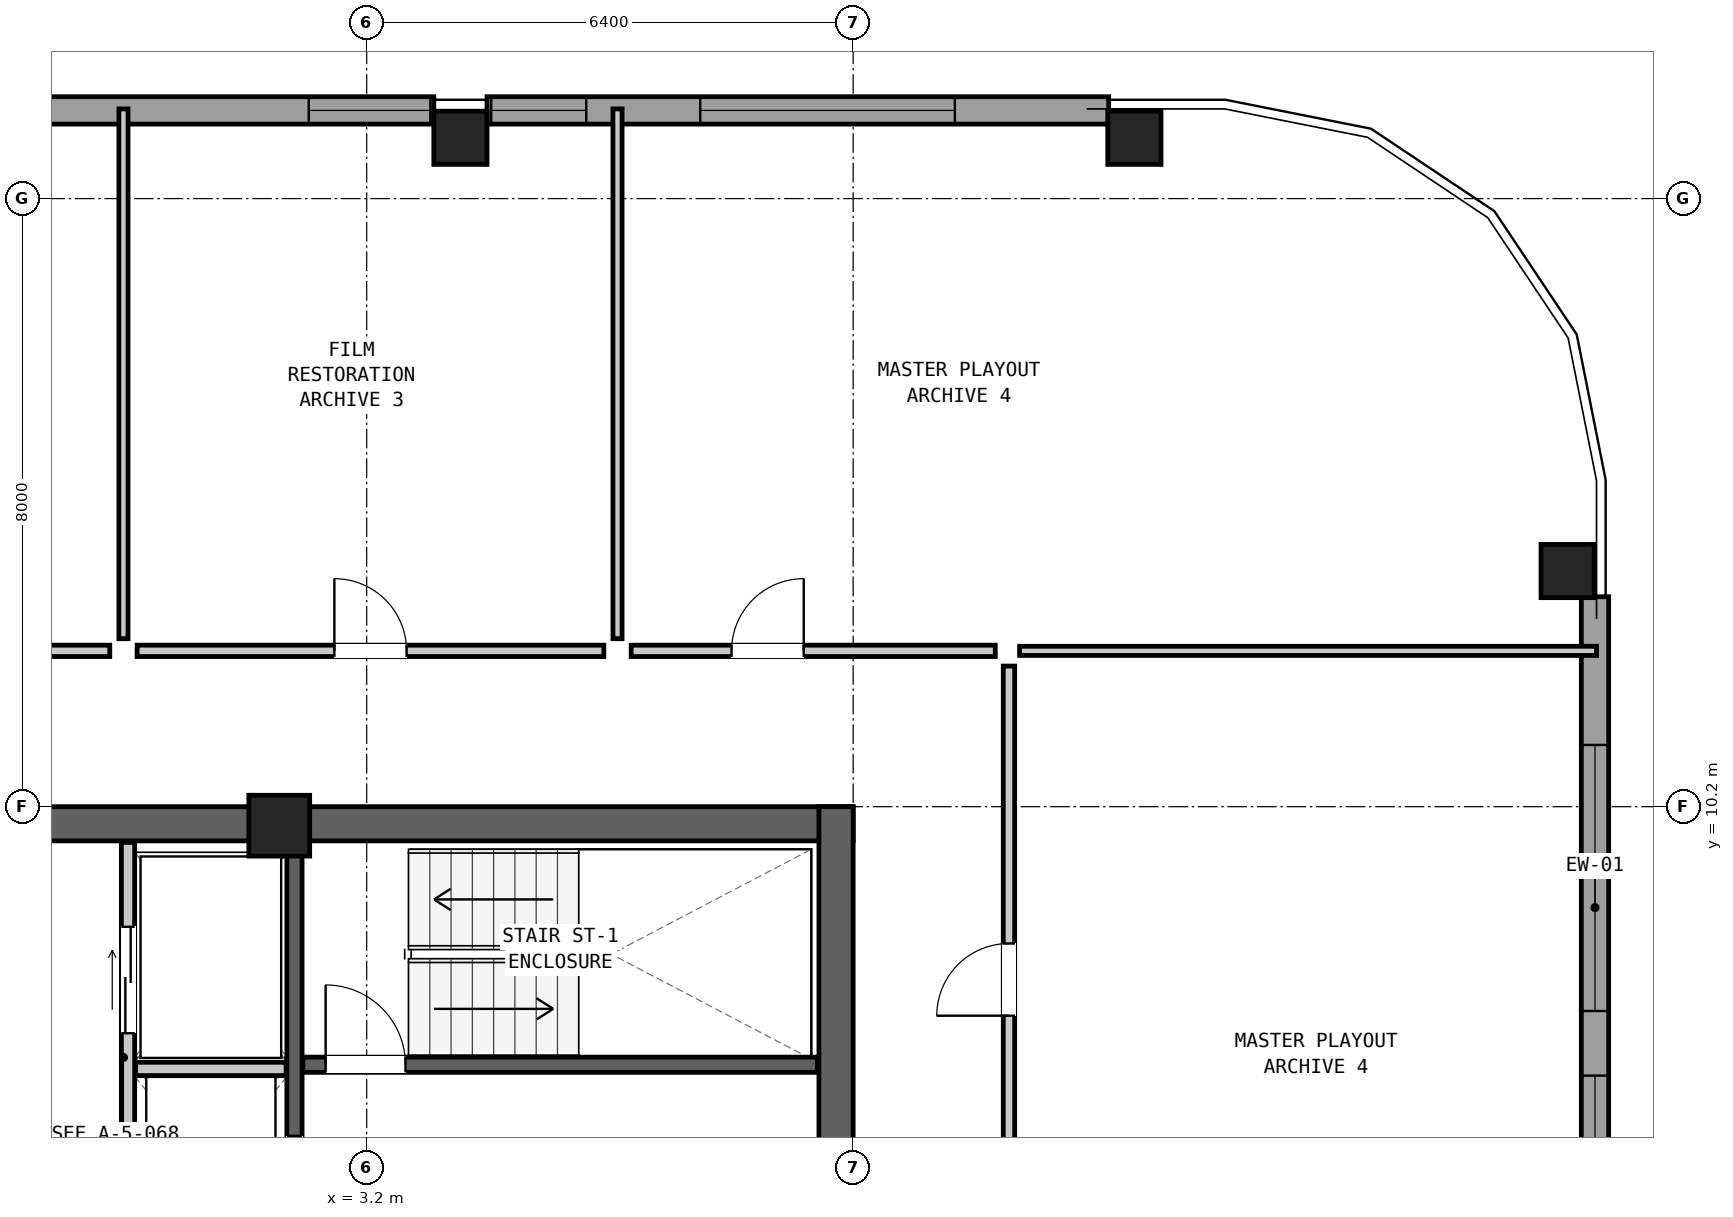
"""IFC4 building model, lengths in metres.
Left out: names, types, materials, properties, quantities, classifications, styles, units other than length and angle.
Written with IfcOpenShell. Run it as: python <this file> out.ifc"""

import sys

from ifc_helpers import new_model, si_unit, direction, frame, frame_2d, origin, origin_2d, place, context, subcontext, project, spatial, rectangle, hollow_rectangle, extrude, element, fill, save


model = new_model("IFC4")
c1 = context("Model", 3, precision=1e-05, world=origin(), true_north=direction((0.0, 1.0)))
c2 = subcontext(c1, "Body", "Model", "MODEL_VIEW")
j1 = project(units=[si_unit("LENGTHUNIT", "METRE"), si_unit("PLANEANGLEUNIT", "RADIAN")], contexts=[c1])
p1 = place(None, origin())
s1 = spatial("IfcSite", under=j1, at=p1, CompositionType="ELEMENT")
p2 = place(p1, origin())
s2 = spatial("IfcBuilding", under=s1, at=p2, CompositionType="ELEMENT")
p3 = place(p2, frame((0.0, 0.0, 220.85)))
s3 = spatial("IfcBuildingStorey", under=s2, at=p3, CompositionType="ELEMENT", Elevation=220.85)
p4 = place(p3, frame((-9.6, 9.975, 0.0), z_axis=(0.0, 0.0, 1.0), x_axis=(1.0, 0.0, 0.0)))
e1 = element("IfcWall", 1, at=p4, inside=s3, PredefinedType="SHEAR", context=c2, shape_type="SweptSolid", body=[
    extrude(rectangle(XDim=19.2, YDim=0.45, at=frame_2d((9.6, 0.0))), origin(), (0.0, 0.0, 1.0), 3.05),
])
p5 = place(p3, frame((9.375, 3.6, 0.0), z_axis=(0.0, 0.0, 1.0), x_axis=(0.0, 1.0, 0.0)))
e2 = element("IfcWall", 2, at=p5, inside=s3, PredefinedType="SHEAR", context=c2, shape_type="SweptSolid", body=[
    extrude(rectangle(XDim=6.6, YDim=0.45, at=frame_2d((3.3, 0.0))), origin(), (0.0, 0.0, 1.0), 3.05),
])
for number, where, z_axis, x_axis in (
    (3, (19.0, 13.3, 0.0), (0.0, 0.0, 1.0), (0.0, 1.0, 0.0)),
    (4, (13.3, 19.0, 0.0), (0.0, 0.0, 1.0), (1.0, 0.0, 0.0)),
    (5, (4.433, 19.0, 0.0), (0.0, 0.0, 1.0), (1.0, 0.0, 0.0)),
):
    element("IfcColumn", number, at=place(p3, frame(where, z_axis=z_axis, x_axis=x_axis)), inside=s3, PredefinedType="COLUMN", context=c2, shape_type="SweptSolid", body=[
        extrude(hollow_rectangle(XDim=0.7, YDim=0.7, WallThickness=0.045, at=origin_2d()), origin(), (0.0, 0.0, 1.0), 3.05),
    ])
p6 = place(p3, frame((2.05, 9.95, 0.0), z_axis=(0.0, 0.0, 1.0), x_axis=(1.0, 0.0, 0.0)))
e6 = element("IfcColumn", 6, at=p6, inside=s3, PredefinedType="COLUMN", context=c2, shape_type="SweptSolid", body=[
    extrude(rectangle(XDim=0.8, YDim=0.8, at=origin_2d()), origin(), (0.0, 0.0, 1.0), 3.05),
])
p7 = place(p3, frame((19.36, 12.962, 0.0), z_axis=(0.0, 0.0, 1.0), x_axis=(0.0, -1.0, 0.0)))
e7 = element("IfcWall", 7, at=p7, inside=s3, PredefinedType="SOLIDWALL", context=c2, shape_type="SweptSolid", body=[
    extrude(rectangle(XDim=8.179, YDim=0.36, at=frame_2d((4.089, 0.0))), origin(), (0.0, 0.0, 1.0), 2.374),
])
p8 = place(p7, frame((1.95, 0.0, 0.2)))
e8 = element("IfcOpeningElement", 8, at=p8, cuts=e7, PredefinedType="OPENING", context=c2, shape_type="SweptSolid", body=[
    extrude(rectangle(XDim=3.5, YDim=0.95, at=frame_2d((1.75, 0.475))), frame((0.0, 0.192, 0.0), z_axis=(0.0, -1.0, 0.0), x_axis=(1.0, 0.0, 0.0)), (0.0, 0.0, 1.0), 0.384),
])
p9 = place(p7, frame((6.3, 0.0, 1.15)))
e9 = element("IfcOpeningElement", 9, at=p9, cuts=e7, PredefinedType="OPENING", context=c2, shape_type="SweptSolid", body=[
    extrude(rectangle(XDim=1.8, YDim=1.05, at=frame_2d((0.9, 0.525))), frame((0.0, 0.192, 0.0), z_axis=(0.0, -1.0, 0.0), x_axis=(1.0, 0.0, 0.0)), (0.0, 0.0, 1.0), 0.384),
])
p10 = place(p3, frame((-4.083, 19.36, 0.0), z_axis=(0.0, 0.0, 1.0), x_axis=(1.0, 0.0, 0.0)))
e10 = element("IfcWall", 10, at=p10, inside=s3, PredefinedType="SOLIDWALL", context=c2, shape_type="SweptSolid", body=[
    extrude(rectangle(XDim=8.167, YDim=0.36, at=frame_2d((4.083, 0.0))), origin(), (0.0, 0.0, 1.0), 2.374),
])
p11 = place(p10, frame((0.071, 0.0, 1.25)))
e11 = element("IfcOpeningElement", 11, at=p11, cuts=e10, PredefinedType="OPENING", context=c2, shape_type="SweptSolid", body=[
    extrude(rectangle(XDim=1.4, YDim=0.95, at=frame_2d((0.7, 0.475))), frame((0.0, 0.192, 0.0), z_axis=(0.0, -1.0, 0.0), x_axis=(1.0, 0.0, 0.0)), (0.0, 0.0, 1.0), 0.384),
])
p12 = place(p10, frame((6.521, 0.0, 1.35)))
e12 = element("IfcOpeningElement", 12, at=p12, cuts=e10, PredefinedType="OPENING", context=c2, shape_type="SweptSolid", body=[
    extrude(rectangle(XDim=1.6, YDim=0.85, at=frame_2d((0.8, 0.425))), frame((0.0, 0.192, 0.0), z_axis=(0.0, -1.0, 0.0), x_axis=(1.0, 0.0, 0.0)), (0.0, 0.0, 1.0), 0.384),
])
p13 = place(p3, frame((4.783, 19.36, 0.0), z_axis=(0.0, 0.0, 1.0), x_axis=(1.0, 0.0, 0.0)))
e13 = element("IfcWall", 13, at=p13, inside=s3, PredefinedType="SOLIDWALL", context=c2, shape_type="SweptSolid", body=[
    extrude(rectangle(XDim=8.179, YDim=0.36, at=frame_2d((4.089, 0.0))), origin(), (0.0, 0.0, 1.0), 2.374),
])
p14 = place(p13, frame((0.055, 0.0, 0.9)))
e14 = element("IfcOpeningElement", 14, at=p14, cuts=e13, PredefinedType="OPENING", context=c2, shape_type="SweptSolid", body=[
    extrude(rectangle(XDim=1.25, YDim=1.3, at=frame_2d((0.625, 0.65))), frame((0.0, 0.192, 0.0), z_axis=(0.0, -1.0, 0.0), x_axis=(1.0, 0.0, 0.0)), (0.0, 0.0, 1.0), 0.384),
])
p15 = place(p13, frame((2.805, 0.0, 0.2)))
e15 = element("IfcOpeningElement", 15, at=p15, cuts=e13, PredefinedType="OPENING", context=c2, shape_type="SweptSolid", body=[
    extrude(rectangle(XDim=3.35, YDim=0.9, at=frame_2d((1.675, 0.45))), frame((0.0, 0.192, 0.0), z_axis=(0.0, -1.0, 0.0), x_axis=(1.0, 0.0, 0.0)), (0.0, 0.0, 1.0), 0.384),
])
p16 = place(p3, frame((2.36, 6.805, 0.0), z_axis=(0.0, 0.0, 1.0), x_axis=(1.0, 0.0, 0.0)))
e16 = element("IfcWall", 16, at=p16, inside=s3, PredefinedType="SHEAR", context=c2, shape_type="SweptSolid", body=[
    extrude(rectangle(XDim=6.77, YDim=0.2, at=frame_2d((3.385, 0.0))), origin(), (0.0, 0.0, 1.0), 2.86),
])
p17 = place(p16, frame((0.3, 0.0, 0.0)))
e17 = element("IfcOpeningElement", 17, at=p17, cuts=e16, PredefinedType="OPENING", context=c2, shape_type="SweptSolid", body=[
    extrude(rectangle(XDim=1.05, YDim=2.08, at=frame_2d((0.525, 1.04))), frame((0.0, 0.112, 0.0), z_axis=(0.0, -1.0, 0.0), x_axis=(1.0, 0.0, 0.0)), (0.0, 0.0, 1.0), 0.224),
])
p18 = place(p3, frame((2.25, 4.07, 0.0), z_axis=(0.0, 0.0, 1.0), x_axis=(0.0, 1.0, 0.0)))
e18 = element("IfcWall", 18, at=p18, inside=s3, PredefinedType="SHEAR", context=c2, shape_type="SweptSolid", body=[
    extrude(rectangle(XDim=5.66, YDim=0.2, at=frame_2d((2.83, 0.0))), origin(), (0.0, 0.0, 1.0), 2.86),
])
p19 = place(p18, frame((0.65, 0.0, 0.0)))
e19 = element("IfcOpeningElement", 19, at=p19, cuts=e18, PredefinedType="OPENING", context=c2, shape_type="SweptSolid", body=[
    extrude(rectangle(XDim=1.15, YDim=2.08, at=frame_2d((0.575, 1.04))), frame((0.0, 0.112, 0.0), z_axis=(0.0, -1.0, 0.0), x_axis=(1.0, 0.0, 0.0)), (0.0, 0.0, 1.0), 0.224),
])
p20 = place(p3, frame((0.06, 4.07, 0.0), z_axis=(0.0, 0.0, 1.0), x_axis=(0.0, 1.0, 0.0)))
e20 = element("IfcWall", 20, at=p20, inside=s3, PredefinedType="PARTITIONING", context=c2, shape_type="SweptSolid", body=[
    extrude(rectangle(XDim=5.66, YDim=0.175, at=frame_2d((2.83, 0.0))), origin(), (0.0, 0.0, 1.0), 2.86),
])
p21 = place(p20, frame((3.15, 0.0, 0.0)))
e21 = element("IfcOpeningElement", 21, at=p21, cuts=e20, PredefinedType="OPENING", context=c2, shape_type="SweptSolid", body=[
    extrude(rectangle(XDim=1.4, YDim=2.12, at=frame_2d((0.7, 1.06))), frame((0.0, 0.1, 0.0), z_axis=(0.0, -1.0, 0.0), x_axis=(1.0, 0.0, 0.0)), (0.0, 0.0, 1.0), 0.199),
])
p22 = place(p3, frame((0.16, 6.75, 0.0), z_axis=(0.0, 0.0, 1.0), x_axis=(1.0, 0.0, 0.0)))
e22 = element("IfcWall", 22, at=p22, inside=s3, PredefinedType="PARTITIONING", context=c2, shape_type="SweptSolid", body=[
    extrude(rectangle(XDim=1.98, YDim=0.175, at=frame_2d((0.99, 0.0))), origin(), (0.0, 0.0, 1.0), 2.86),
])
p23 = place(p3, frame((11.79, 12.25, 0.0), z_axis=(0.0, 0.0, 1.0), x_axis=(1.0, 0.0, 0.0)))
e23 = element("IfcWall", 23, at=p23, inside=s3, PredefinedType="PARTITIONING", context=c2, shape_type="SweptSolid", body=[
    extrude(rectangle(XDim=7.59, YDim=0.12, at=frame_2d((3.795, 0.0))), origin(), (0.0, 0.0, 1.0), 2.86),
])
for number, where, z_axis, x_axis in (
    (24, (0.0, 12.41, 0.0), (0.0, 0.0, 1.0), (0.0, 1.0, 0.0)),
    (25, (6.5, 12.41, 0.0), (0.0, 0.0, 1.0), (0.0, 1.0, 0.0)),
):
    element("IfcWall", number, at=place(p3, frame(where, z_axis=z_axis, x_axis=x_axis)), inside=s3, PredefinedType="PARTITIONING", context=c2, shape_type="SweptSolid", body=[
        extrude(rectangle(XDim=6.97, YDim=0.12, at=frame_2d((3.485, 0.0))), origin(), (0.0, 0.0, 1.0), 2.381),
    ])
p24 = place(p3, frame((-6.32, 12.25, 0.0), z_axis=(0.0, 0.0, 1.0), x_axis=(1.0, 0.0, 0.0)))
e26 = element("IfcWall", 26, at=p24, inside=s3, PredefinedType="PARTITIONING", context=c2, shape_type="SweptSolid", body=[
    extrude(rectangle(XDim=6.14, YDim=0.15, at=frame_2d((3.07, 0.0))), origin(), (0.0, 0.0, 1.0), 2.86),
])
p25 = place(p24, frame((2.595, 0.0, 0.0)))
e27 = element("IfcOpeningElement", 27, at=p25, cuts=e26, PredefinedType="OPENING", context=c2, shape_type="SweptSolid", body=[
    extrude(rectangle(XDim=0.95, YDim=2.1, at=frame_2d((0.475, 1.05))), frame((0.0, 0.087, 0.0), z_axis=(0.0, -1.0, 0.0), x_axis=(1.0, 0.0, 0.0)), (0.0, 0.0, 1.0), 0.174),
])
p26 = place(p3, frame((0.18, 12.25, 0.0), z_axis=(0.0, 0.0, 1.0), x_axis=(1.0, 0.0, 0.0)))
e28 = element("IfcWall", 28, at=p26, inside=s3, PredefinedType="PARTITIONING", context=c2, shape_type="SweptSolid", body=[
    extrude(rectangle(XDim=6.14, YDim=0.15, at=frame_2d((3.07, 0.0))), origin(), (0.0, 0.0, 1.0), 2.86),
])
p27 = place(p26, frame((2.595, 0.0, 0.0)))
e29 = element("IfcOpeningElement", 29, at=p27, cuts=e28, PredefinedType="OPENING", context=c2, shape_type="SweptSolid", body=[
    extrude(rectangle(XDim=0.95, YDim=2.1, at=frame_2d((0.475, 1.05))), frame((0.0, 0.087, 0.0), z_axis=(0.0, -1.0, 0.0), x_axis=(1.0, 0.0, 0.0)), (0.0, 0.0, 1.0), 0.174),
])
p28 = place(p3, frame((6.68, 12.25, 0.0), z_axis=(0.0, 0.0, 1.0), x_axis=(1.0, 0.0, 0.0)))
e30 = element("IfcWall", 30, at=p28, inside=s3, PredefinedType="PARTITIONING", context=c2, shape_type="SweptSolid", body=[
    extrude(rectangle(XDim=4.79, YDim=0.15, at=frame_2d((2.395, 0.0))), origin(), (0.0, 0.0, 1.0), 2.86),
])
p29 = place(p28, frame((1.32, 0.0, 0.0)))
e31 = element("IfcOpeningElement", 31, at=p29, cuts=e30, PredefinedType="OPENING", context=c2, shape_type="SweptSolid", body=[
    extrude(rectangle(XDim=0.95, YDim=2.1, at=frame_2d((0.475, 1.05))), frame((0.0, 0.087, 0.0), z_axis=(0.0, -1.0, 0.0), x_axis=(1.0, 0.0, 0.0)), (0.0, 0.0, 1.0), 0.174),
])
p30 = place(p3, frame((11.65, 3.8, 0.0), z_axis=(0.0, 0.0, 1.0), x_axis=(0.0, 1.0, 0.0)))
e32 = element("IfcWall", 32, at=p30, inside=s3, PredefinedType="PARTITIONING", context=c2, shape_type="SweptSolid", body=[
    extrude(rectangle(XDim=8.25, YDim=0.15, at=frame_2d((4.125, 0.0))), origin(), (0.0, 0.0, 1.0), 2.86),
])
p31 = place(p30, frame((3.65, 0.0, 0.0)))
e33 = element("IfcOpeningElement", 33, at=p31, cuts=e32, PredefinedType="OPENING", context=c2, shape_type="SweptSolid", body=[
    extrude(rectangle(XDim=0.95, YDim=2.1, at=frame_2d((0.475, 1.05))), frame((0.0, 0.087, 0.0), z_axis=(0.0, -1.0, 0.0), x_axis=(1.0, 0.0, 0.0)), (0.0, 0.0, 1.0), 0.174),
])
p32 = place(p8, origin())
e34 = element("IfcWindow", 34, at=p32, inside=s3, PartitioningType="SINGLE_PANEL", PredefinedType="WINDOW", context=c2, shape_type="SweptSolid", body=[
    extrude(rectangle(XDim=3.5, YDim=0.95, at=frame_2d((1.75, 0.475))), frame((0.0, 0.03, 0.0), z_axis=(0.0, -1.0, 0.0), x_axis=(1.0, 0.0, 0.0)), (0.0, 0.0, 1.0), 0.06),
])
fill(e8, e34)
p33 = place(p9, origin())
e35 = element("IfcWindow", 35, at=p33, inside=s3, PartitioningType="SINGLE_PANEL", PredefinedType="WINDOW", context=c2, shape_type="SweptSolid", body=[
    extrude(rectangle(XDim=1.8, YDim=1.05, at=frame_2d((0.9, 0.525))), frame((0.0, 0.03, 0.0), z_axis=(0.0, -1.0, 0.0), x_axis=(1.0, 0.0, 0.0)), (0.0, 0.0, 1.0), 0.06),
])
fill(e9, e35)
p34 = place(p12, origin())
e36 = element("IfcWindow", 36, at=p34, inside=s3, PartitioningType="SINGLE_PANEL", PredefinedType="WINDOW", context=c2, shape_type="SweptSolid", body=[
    extrude(rectangle(XDim=1.6, YDim=0.85, at=frame_2d((0.8, 0.425))), frame((0.0, 0.03, 0.0), z_axis=(0.0, -1.0, 0.0), x_axis=(1.0, 0.0, 0.0)), (0.0, 0.0, 1.0), 0.06),
])
fill(e12, e36)
p35 = place(p14, origin())
e37 = element("IfcWindow", 37, at=p35, inside=s3, PartitioningType="SINGLE_PANEL", PredefinedType="WINDOW", context=c2, shape_type="SweptSolid", body=[
    extrude(rectangle(XDim=1.25, YDim=1.3, at=frame_2d((0.625, 0.65))), frame((0.0, 0.03, 0.0), z_axis=(0.0, -1.0, 0.0), x_axis=(1.0, 0.0, 0.0)), (0.0, 0.0, 1.0), 0.06),
])
fill(e14, e37)
p36 = place(p15, origin())
e38 = element("IfcWindow", 38, at=p36, inside=s3, PartitioningType="SINGLE_PANEL", PredefinedType="WINDOW", context=c2, shape_type="SweptSolid", body=[
    extrude(rectangle(XDim=3.35, YDim=0.9, at=frame_2d((1.675, 0.45))), frame((0.0, 0.03, 0.0), z_axis=(0.0, -1.0, 0.0), x_axis=(1.0, 0.0, 0.0)), (0.0, 0.0, 1.0), 0.06),
])
fill(e15, e38)
p37 = place(p17, origin())
e39 = element("IfcDoor", 39, at=p37, inside=s3, OperationType="SINGLE_SWING_LEFT", PredefinedType="DOOR", context=c2, shape_type="SweptSolid", body=[
    extrude(rectangle(XDim=1.05, YDim=2.08, at=frame_2d((0.525, 1.04))), frame((0.0, 0.025, 0.0), z_axis=(0.0, -1.0, 0.0), x_axis=(1.0, 0.0, 0.0)), (0.0, 0.0, 1.0), 0.05),
])
fill(e17, e39)
p38 = place(p19, origin())
e40 = element("IfcDoor", 40, at=p38, inside=s3, OperationType="DOUBLE_DOOR_SLIDING", PredefinedType="DOOR", context=c2, shape_type="SweptSolid", body=[
    extrude(rectangle(XDim=1.15, YDim=2.08, at=frame_2d((0.575, 1.04))), frame((0.0, 0.025, 0.0), z_axis=(0.0, -1.0, 0.0), x_axis=(1.0, 0.0, 0.0)), (0.0, 0.0, 1.0), 0.05),
])
fill(e19, e40)
p39 = place(p21, origin())
e41 = element("IfcDoor", 41, at=p39, inside=s3, OperationType="DOUBLE_DOOR_SLIDING", PredefinedType="DOOR", context=c2, shape_type="SweptSolid", body=[
    extrude(rectangle(XDim=1.4, YDim=2.12, at=frame_2d((0.7, 1.06))), frame((0.0, 0.025, 0.0), z_axis=(0.0, -1.0, 0.0), x_axis=(1.0, 0.0, 0.0)), (0.0, 0.0, 1.0), 0.05),
])
fill(e21, e41)
p40 = place(p27, origin())
e42 = element("IfcDoor", 42, at=p40, inside=s3, OperationType="SINGLE_SWING_LEFT", PredefinedType="DOOR", context=c2, shape_type="SweptSolid", body=[
    extrude(rectangle(XDim=0.95, YDim=2.1, at=frame_2d((0.475, 1.05))), frame((0.0, 0.025, 0.0), z_axis=(0.0, -1.0, 0.0), x_axis=(1.0, 0.0, 0.0)), (0.0, 0.0, 1.0), 0.05),
])
fill(e29, e42)
p41 = place(p29, origin())
e43 = element("IfcDoor", 43, at=p41, inside=s3, OperationType="SINGLE_SWING_RIGHT", PredefinedType="DOOR", context=c2, shape_type="SweptSolid", body=[
    extrude(rectangle(XDim=0.95, YDim=2.1, at=frame_2d((0.475, 1.05))), frame((0.0, 0.025, 0.0), z_axis=(0.0, -1.0, 0.0), x_axis=(1.0, 0.0, 0.0)), (0.0, 0.0, 1.0), 0.05),
])
fill(e31, e43)
p42 = place(p31, origin())
e44 = element("IfcDoor", 44, at=p42, inside=s3, OperationType="SINGLE_SWING_LEFT", PredefinedType="DOOR", context=c2, shape_type="SweptSolid", body=[
    extrude(rectangle(XDim=0.95, YDim=2.1, at=frame_2d((0.475, 1.05))), frame((0.0, 0.025, 0.0), z_axis=(0.0, -1.0, 0.0), x_axis=(1.0, 0.0, 0.0)), (0.0, 0.0, 1.0), 0.05),
])
fill(e33, e44)
save(model, sys.argv[1])
